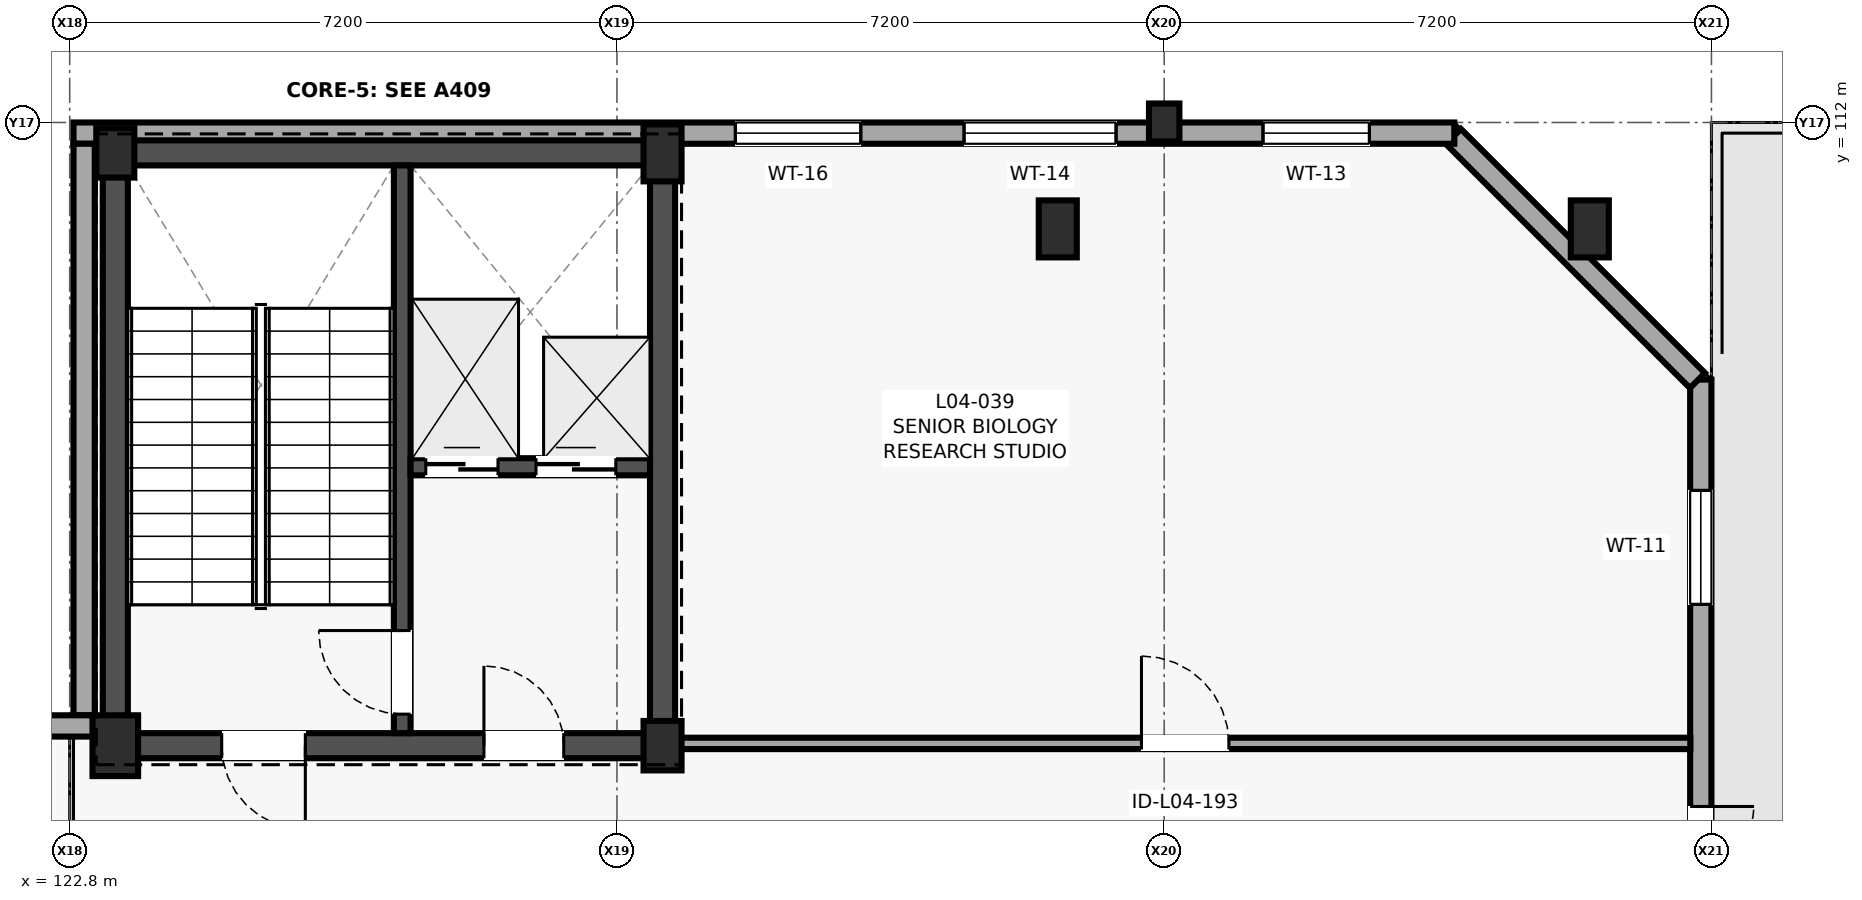
"""IFC4 building model, lengths in metres.
Left out: names, types, materials, properties, quantities, classifications, styles, units other than length and angle.
Written with IfcOpenShell. Run it as: python <this file> out.ifc"""

import sys

from ifc_helpers import new_model, si_unit, direction, frame, frame_2d, origin, origin_2d, place, context, subcontext, project, spatial, rectangle, extrude, element, fill, save


model = new_model("IFC4")
c1 = context("Model", 3, precision=1e-05, world=origin(), true_north=direction((0.0, 1.0)))
c2 = subcontext(c1, "Body", "Model", "MODEL_VIEW")
j1 = project(units=[si_unit("LENGTHUNIT", "METRE"), si_unit("PLANEANGLEUNIT", "RADIAN")], contexts=[c1])
p1 = place(None, origin())
s1 = spatial("IfcSite", under=j1, at=p1, CompositionType="ELEMENT")
p2 = place(p1, origin())
s2 = spatial("IfcBuilding", under=s1, at=p2, CompositionType="ELEMENT")
p3 = place(p2, frame((0.0, 0.0, 16.2)))
s3 = spatial("IfcBuildingStorey", under=s2, at=p3, CompositionType="ELEMENT", Elevation=16.2)
p4 = place(p3, frame((123.4, 103.8, 0.0), z_axis=(0.0, 0.0, 1.0), x_axis=(1.0, 0.0, 0.0)))
e1 = element("IfcColumn", 1, at=p4, inside=s3, PredefinedType="COLUMN", context=c2, shape_type="SweptSolid", body=[
    extrude(rectangle(XDim=0.6, YDim=0.8, at=origin_2d()), origin(), (0.0, 0.0, 1.0), 4.0),
])
for number, where, z_axis, x_axis in (
    (2, (123.4, 111.6, 0.0), (0.0, 0.0, 1.0), (1.0, 0.0, 0.0)),
    (3, (130.6, 103.8, 0.0), (0.0, 0.0, 1.0), (1.0, 0.0, 0.0)),
):
    element("IfcColumn", number, at=place(p3, frame(where, z_axis=z_axis, x_axis=x_axis)), inside=s3, PredefinedType="COLUMN", context=c2, shape_type="SweptSolid", body=[
        extrude(rectangle(XDim=0.5, YDim=0.65, at=origin_2d()), origin(), (0.0, 0.0, 1.0), 4.0),
    ])
for number, where, z_axis, x_axis in (
    (4, (130.6, 111.6, 0.0), (0.0, 0.0, 1.0), (1.0, 0.0, 0.0)),
    (5, (135.8, 110.6, 0.0), (0.0, 0.0, 1.0), (1.0, 0.0, 0.0)),
):
    element("IfcColumn", number, at=place(p3, frame(where, z_axis=z_axis, x_axis=x_axis)), inside=s3, PredefinedType="COLUMN", context=c2, shape_type="SweptSolid", body=[
        extrude(rectangle(XDim=0.5, YDim=0.75, at=origin_2d()), origin(), (0.0, 0.0, 1.0), 4.0),
    ])
p5 = place(p3, frame((137.2, 112.0, 0.0), z_axis=(0.0, 0.0, 1.0), x_axis=(1.0, 0.0, 0.0)))
e6 = element("IfcColumn", 6, at=p5, inside=s3, PredefinedType="PILASTER", context=c2, shape_type="SweptSolid", body=[
    extrude(rectangle(XDim=0.4, YDim=0.5, at=origin_2d()), origin(), (0.0, 0.0, 1.0), 4.0),
])
p6 = place(p3, frame((142.8, 110.6, 0.0), z_axis=(0.0, 0.0, 1.0), x_axis=(1.0, 0.0, 0.0)))
e7 = element("IfcColumn", 7, at=p6, inside=s3, PredefinedType="COLUMN", context=c2, shape_type="SweptSolid", body=[
    extrude(rectangle(XDim=0.5, YDim=0.75, at=origin_2d()), origin(), (0.0, 0.0, 1.0), 4.0),
])
p7 = place(p3, frame((144.26, 99.783, 0.0), z_axis=(0.0, 0.0, 1.0), x_axis=(0.0, 1.0, 0.0)))
e8 = element("IfcWall", 8, at=p7, inside=s3, PredefinedType="SOLIDWALL", context=c2, shape_type="SweptSolid", body=[
    extrude(rectangle(XDim=8.834, YDim=0.28, at=frame_2d((4.417, 0.0))), origin(), (0.0, 0.0, 1.0), 3.78),
])
p8 = place(p7, frame((1.817, 0.0, 0.0)))
e9 = element("IfcOpeningElement", 9, at=p8, cuts=e8, PredefinedType="OPENING", context=c2, shape_type="SweptSolid", body=[
    extrude(rectangle(XDim=1.4, YDim=2.15, at=frame_2d((0.7, 1.075))), frame((0.0, 0.15, 0.0), z_axis=(0.0, -1.0, 0.0), x_axis=(1.0, 0.0, 0.0)), (0.0, 0.0, 1.0), 0.3),
])
p9 = place(p7, frame((5.876, 0.0, 0.75)))
e10 = element("IfcOpeningElement", 10, at=p9, cuts=e8, PredefinedType="OPENING", context=c2, shape_type="SweptSolid", body=[
    extrude(rectangle(XDim=1.5, YDim=2.2, at=frame_2d((0.75, 1.1))), frame((0.0, 0.15, 0.0), z_axis=(0.0, -1.0, 0.0), x_axis=(1.0, 0.0, 0.0)), (0.0, 0.0, 1.0), 0.3),
])
p10 = place(p3, frame((144.216, 108.605, 0.0), z_axis=(0.0, 0.0, 1.0), x_axis=(-0.707133661755, 0.707079899597, 0.0)))
e11 = element("IfcWall", 11, at=p10, inside=s3, PredefinedType="SOLIDWALL", context=c2, shape_type="SweptSolid", body=[
    extrude(rectangle(XDim=4.541, YDim=0.28, at=frame_2d((2.271, 0.0))), origin(), (0.0, 0.0, 1.0), 3.78),
])
p11 = place(p3, frame((141.017, 111.86, 0.0), z_axis=(0.0, 0.0, 1.0), x_axis=(-1.0, 0.0, 0.0)))
e12 = element("IfcWall", 12, at=p11, inside=s3, PredefinedType="SOLIDWALL", context=c2, shape_type="SweptSolid", body=[
    extrude(rectangle(XDim=18.167, YDim=0.28, at=frame_2d((9.083, 0.0))), origin(), (0.0, 0.0, 1.0), 3.78),
])
p12 = place(p11, frame((1.117, 0.0, 0.75)))
e13 = element("IfcOpeningElement", 13, at=p12, cuts=e12, PredefinedType="OPENING", context=c2, shape_type="SweptSolid", body=[
    extrude(rectangle(XDim=1.4, YDim=2.4, at=frame_2d((0.7, 1.2))), frame((0.0, 0.15, 0.0), z_axis=(0.0, -1.0, 0.0), x_axis=(1.0, 0.0, 0.0)), (0.0, 0.0, 1.0), 0.3),
])
p13 = place(p11, frame((4.45, 0.0, 0.75)))
e14 = element("IfcOpeningElement", 14, at=p13, cuts=e12, PredefinedType="OPENING", context=c2, shape_type="SweptSolid", body=[
    extrude(rectangle(XDim=2.0, YDim=2.1, at=frame_2d((1.0, 1.05))), frame((0.0, 0.15, 0.0), z_axis=(0.0, -1.0, 0.0), x_axis=(1.0, 0.0, 0.0)), (0.0, 0.0, 1.0), 0.3),
])
p14 = place(p11, frame((7.809, 0.0, 0.85)))
e15 = element("IfcOpeningElement", 15, at=p14, cuts=e12, PredefinedType="OPENING", context=c2, shape_type="SweptSolid", body=[
    extrude(rectangle(XDim=1.65, YDim=1.95, at=frame_2d((0.825, 0.975))), frame((0.0, 0.15, 0.0), z_axis=(0.0, -1.0, 0.0), x_axis=(1.0, 0.0, 0.0)), (0.0, 0.0, 1.0), 0.3),
])
p15 = place(p3, frame((122.99, 111.72, 0.0), z_axis=(0.0, 0.0, 1.0), x_axis=(0.0, -1.0, 0.0)))
e16 = element("IfcWall", 16, at=p15, inside=s3, PredefinedType="SOLIDWALL", context=c2, shape_type="SweptSolid", body=[
    extrude(rectangle(XDim=7.52, YDim=0.28, at=frame_2d((3.76, 0.0))), origin(), (0.0, 0.0, 1.0), 3.78),
])
p16 = place(p3, frame((123.13, 104.06, 0.0), z_axis=(0.0, 0.0, 1.0), x_axis=(-1.0, 0.0, 0.0)))
e17 = element("IfcWall", 17, at=p16, inside=s3, PredefinedType="SOLIDWALL", context=c2, shape_type="SweptSolid", body=[
    extrude(rectangle(XDim=7.53, YDim=0.28, at=frame_2d((3.765, 0.0))), origin(), (0.0, 0.0, 1.0), 3.78),
])
p17 = place(p16, frame((0.983, 0.0, 0.85)))
e18 = element("IfcOpeningElement", 18, at=p17, cuts=e17, PredefinedType="OPENING", context=c2, shape_type="SweptSolid", body=[
    extrude(rectangle(XDim=1.8, YDim=1.8, at=frame_2d((0.9, 0.9))), frame((0.0, 0.15, 0.0), z_axis=(0.0, -1.0, 0.0), x_axis=(1.0, 0.0, 0.0)), (0.0, 0.0, 1.0), 0.3),
])
p18 = place(p16, frame((5.098, 0.0, 0.75)))
e19 = element("IfcOpeningElement", 19, at=p18, cuts=e17, PredefinedType="OPENING", context=c2, shape_type="SweptSolid", body=[
    extrude(rectangle(XDim=1.1, YDim=2.1, at=frame_2d((0.55, 1.05))), frame((0.0, 0.15, 0.0), z_axis=(0.0, -1.0, 0.0), x_axis=(1.0, 0.0, 0.0)), (0.0, 0.0, 1.0), 0.3),
])
p19 = place(p3, frame((123.235, 103.8, 0.0), z_axis=(0.0, 0.0, 1.0), x_axis=(1.0, 0.0, 0.0)))
e20 = element("IfcWall", 20, at=p19, inside=s3, PredefinedType="SHEAR", context=c2, shape_type="SweptSolid", body=[
    extrude(rectangle(XDim=7.53, YDim=0.33, at=frame_2d((3.765, 0.0))), origin(), (0.0, 0.0, 1.0), 3.78),
])
p20 = place(p19, frame((5.015, 0.0, 0.0)))
e21 = element("IfcOpeningElement", 21, at=p20, cuts=e20, PredefinedType="OPENING", context=c2, shape_type="SweptSolid", body=[
    extrude(rectangle(XDim=1.05, YDim=2.15, at=frame_2d((0.525, 1.075))), frame((0.0, 0.175, 0.0), z_axis=(0.0, -1.0, 0.0), x_axis=(1.0, 0.0, 0.0)), (0.0, 0.0, 1.0), 0.35),
])
p21 = place(p19, frame((1.565, 0.0, 0.0)))
e22 = element("IfcOpeningElement", 22, at=p21, cuts=e20, PredefinedType="OPENING", context=c2, shape_type="SweptSolid", body=[
    extrude(rectangle(XDim=1.1, YDim=2.15, at=frame_2d((0.55, 1.075))), frame((0.0, 0.175, 0.0), z_axis=(0.0, -1.0, 0.0), x_axis=(1.0, 0.0, 0.0)), (0.0, 0.0, 1.0), 0.35),
])
p22 = place(p3, frame((123.235, 111.6, 0.0), z_axis=(0.0, 0.0, 1.0), x_axis=(1.0, 0.0, 0.0)))
e23 = element("IfcWall", 23, at=p22, inside=s3, PredefinedType="SHEAR", context=c2, shape_type="SweptSolid", body=[
    extrude(rectangle(XDim=7.53, YDim=0.33, at=frame_2d((3.765, 0.0))), origin(), (0.0, 0.0, 1.0), 3.78),
])
for number, where, z_axis, x_axis in (
    (24, (123.4, 103.965, 0.0), (0.0, 0.0, 1.0), (0.0, 1.0, 0.0)),
    (25, (130.6, 103.965, 0.0), (0.0, 0.0, 1.0), (0.0, 1.0, 0.0)),
):
    element("IfcWall", number, at=place(p3, frame(where, z_axis=z_axis, x_axis=x_axis)), inside=s3, PredefinedType="SHEAR", context=c2, shape_type="SweptSolid", body=[
        extrude(rectangle(XDim=7.47, YDim=0.33, at=frame_2d((3.735, 0.0))), origin(), (0.0, 0.0, 1.0), 3.78),
    ])
p23 = place(p3, frame((127.175, 103.965, 0.0), z_axis=(0.0, 0.0, 1.0), x_axis=(0.0, 1.0, 0.0)))
e26 = element("IfcWall", 26, at=p23, inside=s3, PredefinedType="SHEAR", context=c2, shape_type="SweptSolid", body=[
    extrude(rectangle(XDim=7.47, YDim=0.22, at=frame_2d((3.735, 0.0))), origin(), (0.0, 0.0, 1.0), 3.78),
])
p24 = place(p23, frame((0.25, 0.0, 0.0)))
e27 = element("IfcOpeningElement", 27, at=p24, cuts=e26, PredefinedType="OPENING", context=c2, shape_type="SweptSolid", body=[
    extrude(rectangle(XDim=1.1, YDim=2.15, at=frame_2d((0.55, 1.075))), frame((0.0, 0.12, 0.0), z_axis=(0.0, -1.0, 0.0), x_axis=(1.0, 0.0, 0.0)), (0.0, 0.0, 1.0), 0.24),
])
p25 = place(p3, frame((127.285, 107.47, 0.0), z_axis=(0.0, 0.0, 1.0), x_axis=(1.0, 0.0, 0.0)))
e28 = element("IfcWall", 28, at=p25, inside=s3, PredefinedType="SHEAR", context=c2, shape_type="SweptSolid", body=[
    extrude(rectangle(XDim=3.15, YDim=0.225, at=frame_2d((1.575, 0.0))), origin(), (0.0, 0.0, 1.0), 3.78),
])
p26 = place(p25, frame((0.2, 0.0, 0.0)))
e29 = element("IfcOpeningElement", 29, at=p26, cuts=e28, PredefinedType="OPENING", context=c2, shape_type="SweptSolid", body=[
    extrude(rectangle(XDim=0.95, YDim=2.15, at=frame_2d((0.475, 1.075))), frame((0.0, 0.123, 0.0), z_axis=(0.0, -1.0, 0.0), x_axis=(1.0, 0.0, 0.0)), (0.0, 0.0, 1.0), 0.245),
])
p27 = place(p25, frame((1.65, 0.0, 0.0)))
e30 = element("IfcOpeningElement", 30, at=p27, cuts=e28, PredefinedType="OPENING", context=c2, shape_type="SweptSolid", body=[
    extrude(rectangle(XDim=1.05, YDim=2.2, at=frame_2d((0.525, 1.1))), frame((0.0, 0.123, 0.0), z_axis=(0.0, -1.0, 0.0), x_axis=(1.0, 0.0, 0.0)), (0.0, 0.0, 1.0), 0.245),
])
p28 = place(p3, frame((130.83, 103.83, 0.0), z_axis=(0.0, 0.0, 1.0), x_axis=(1.0, 0.0, 0.0)))
e31 = element("IfcWall", 31, at=p28, inside=s3, PredefinedType="PARTITIONING", context=c2, shape_type="SweptSolid", body=[
    extrude(rectangle(XDim=13.292, YDim=0.15, at=frame_2d((6.646, 0.0))), origin(), (0.0, 0.0, 1.0), 3.76),
])
p29 = place(p28, frame((6.071, 0.0, 0.0)))
e32 = element("IfcOpeningElement", 32, at=p29, cuts=e31, PredefinedType="OPENING", context=c2, shape_type="SweptSolid", body=[
    extrude(rectangle(XDim=1.15, YDim=2.2, at=frame_2d((0.575, 1.1))), frame((0.0, 0.085, 0.0), z_axis=(0.0, -1.0, 0.0), x_axis=(1.0, 0.0, 0.0)), (0.0, 0.0, 1.0), 0.17),
])
p30 = place(p8, frame((1.4, 0.0, 0.0), z_axis=(0.0, 0.0, 1.0), x_axis=(-1.0, 0.0, 0.0)))
e33 = element("IfcDoor", 33, at=p30, inside=s3, OperationType="DOUBLE_DOOR_SINGLE_SWING", PredefinedType="DOOR", context=c2, shape_type="SweptSolid", body=[
    extrude(rectangle(XDim=1.4, YDim=2.15, at=frame_2d((0.7, 1.075))), frame((0.0, 0.025, 0.0), z_axis=(0.0, -1.0, 0.0), x_axis=(1.0, 0.0, 0.0)), (0.0, 0.0, 1.0), 0.05),
])
fill(e9, e33)
p31 = place(p9, origin())
e34 = element("IfcWindow", 34, at=p31, inside=s3, PartitioningType="SINGLE_PANEL", PredefinedType="WINDOW", context=c2, shape_type="SweptSolid", body=[
    extrude(rectangle(XDim=1.5, YDim=2.2, at=frame_2d((0.75, 1.1))), frame((0.0, 0.03, 0.0), z_axis=(0.0, -1.0, 0.0), x_axis=(1.0, 0.0, 0.0)), (0.0, 0.0, 1.0), 0.06),
])
fill(e10, e34)
p32 = place(p12, origin())
e35 = element("IfcWindow", 35, at=p32, inside=s3, PartitioningType="SINGLE_PANEL", PredefinedType="WINDOW", context=c2, shape_type="SweptSolid", body=[
    extrude(rectangle(XDim=1.4, YDim=2.4, at=frame_2d((0.7, 1.2))), frame((0.0, 0.03, 0.0), z_axis=(0.0, -1.0, 0.0), x_axis=(1.0, 0.0, 0.0)), (0.0, 0.0, 1.0), 0.06),
])
fill(e13, e35)
p33 = place(p13, origin())
e36 = element("IfcWindow", 36, at=p33, inside=s3, PartitioningType="SINGLE_PANEL", PredefinedType="WINDOW", context=c2, shape_type="SweptSolid", body=[
    extrude(rectangle(XDim=2.0, YDim=2.1, at=frame_2d((1.0, 1.05))), frame((0.0, 0.03, 0.0), z_axis=(0.0, -1.0, 0.0), x_axis=(1.0, 0.0, 0.0)), (0.0, 0.0, 1.0), 0.06),
])
fill(e14, e36)
p34 = place(p14, origin())
e37 = element("IfcWindow", 37, at=p34, inside=s3, PartitioningType="SINGLE_PANEL", PredefinedType="WINDOW", context=c2, shape_type="SweptSolid", body=[
    extrude(rectangle(XDim=1.65, YDim=1.95, at=frame_2d((0.825, 0.975))), frame((0.0, 0.03, 0.0), z_axis=(0.0, -1.0, 0.0), x_axis=(1.0, 0.0, 0.0)), (0.0, 0.0, 1.0), 0.06),
])
fill(e15, e37)
p35 = place(p26, origin())
e38 = element("IfcDoor", 38, at=p35, inside=s3, OperationType="SLIDING_TO_LEFT", PredefinedType="DOOR", context=c2, shape_type="SweptSolid", body=[
    extrude(rectangle(XDim=0.95, YDim=2.15, at=frame_2d((0.475, 1.075))), frame((0.0, 0.025, 0.0), z_axis=(0.0, -1.0, 0.0), x_axis=(1.0, 0.0, 0.0)), (0.0, 0.0, 1.0), 0.05),
])
fill(e29, e38)
p36 = place(p27, origin())
e39 = element("IfcDoor", 39, at=p36, inside=s3, OperationType="SLIDING_TO_RIGHT", PredefinedType="DOOR", context=c2, shape_type="SweptSolid", body=[
    extrude(rectangle(XDim=1.05, YDim=2.2, at=frame_2d((0.525, 1.1))), frame((0.0, 0.025, 0.0), z_axis=(0.0, -1.0, 0.0), x_axis=(1.0, 0.0, 0.0)), (0.0, 0.0, 1.0), 0.05),
])
fill(e30, e39)
p37 = place(p24, origin())
e40 = element("IfcDoor", 40, at=p37, inside=s3, OperationType="SINGLE_SWING_RIGHT", PredefinedType="DOOR", context=c2, shape_type="SweptSolid", body=[
    extrude(rectangle(XDim=1.1, YDim=2.15, at=frame_2d((0.55, 1.075))), frame((0.0, 0.025, 0.0), z_axis=(0.0, -1.0, 0.0), x_axis=(1.0, 0.0, 0.0)), (0.0, 0.0, 1.0), 0.05),
])
fill(e27, e40)
p38 = place(p20, origin())
e41 = element("IfcDoor", 41, at=p38, inside=s3, OperationType="SINGLE_SWING_LEFT", PredefinedType="DOOR", context=c2, shape_type="SweptSolid", body=[
    extrude(rectangle(XDim=1.05, YDim=2.15, at=frame_2d((0.525, 1.075))), frame((0.0, 0.025, 0.0), z_axis=(0.0, -1.0, 0.0), x_axis=(1.0, 0.0, 0.0)), (0.0, 0.0, 1.0), 0.05),
])
fill(e21, e41)
p39 = place(p21, frame((1.1, 0.0, 0.0), z_axis=(0.0, 0.0, 1.0), x_axis=(-1.0, 0.0, 0.0)))
e42 = element("IfcDoor", 42, at=p39, inside=s3, OperationType="SINGLE_SWING_RIGHT", PredefinedType="DOOR", context=c2, shape_type="SweptSolid", body=[
    extrude(rectangle(XDim=1.1, YDim=2.15, at=frame_2d((0.55, 1.075))), frame((0.0, 0.025, 0.0), z_axis=(0.0, -1.0, 0.0), x_axis=(1.0, 0.0, 0.0)), (0.0, 0.0, 1.0), 0.05),
])
fill(e22, e42)
p40 = place(p29, origin())
e43 = element("IfcDoor", 43, at=p40, inside=s3, OperationType="SINGLE_SWING_LEFT", PredefinedType="DOOR", context=c2, shape_type="SweptSolid", body=[
    extrude(rectangle(XDim=1.15, YDim=2.2, at=frame_2d((0.575, 1.1))), frame((0.0, 0.025, 0.0), z_axis=(0.0, -1.0, 0.0), x_axis=(1.0, 0.0, 0.0)), (0.0, 0.0, 1.0), 0.05),
])
fill(e32, e43)
save(model, sys.argv[1])
